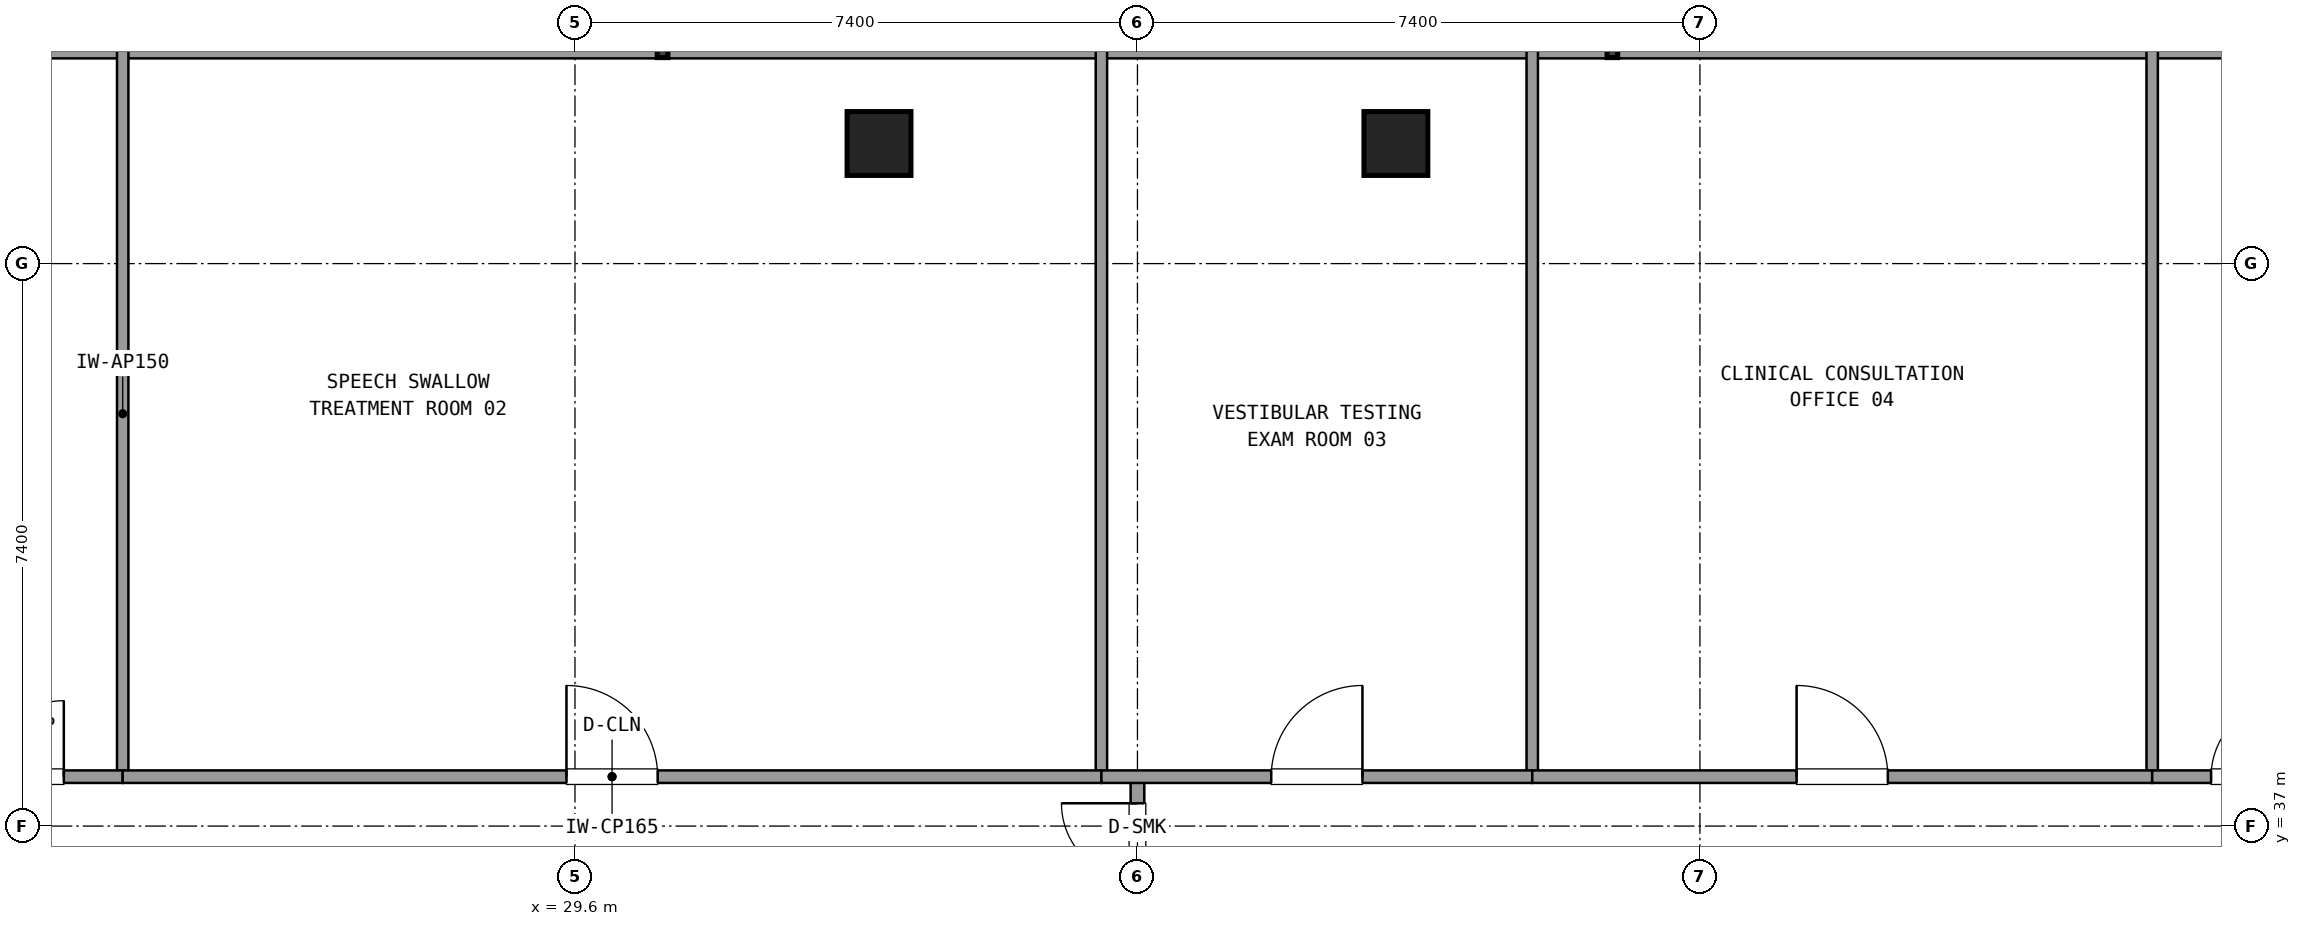
"""IFC4 building model, lengths in metres.
Left out: names, types, materials, properties, quantities, classifications, styles, units other than length and angle.
Written with IfcOpenShell. Run it as: python <this file> out.ifc"""

import sys

from ifc_helpers import new_model, si_unit, direction, frame, frame_2d, origin, origin_2d, place, context, subcontext, project, spatial, rectangle, extrude, element, fill, save


model = new_model("IFC4")
c1 = context("Model", 3, precision=1e-05, world=origin(), true_north=direction((0.0, 1.0)))
c2 = subcontext(c1, "Body", "Model", "MODEL_VIEW")
j1 = project(units=[si_unit("LENGTHUNIT", "METRE"), si_unit("PLANEANGLEUNIT", "RADIAN")], contexts=[c1])
p1 = place(None, origin())
s1 = spatial("IfcSite", under=j1, at=p1, CompositionType="ELEMENT")
p2 = place(p1, origin())
s2 = spatial("IfcBuilding", under=s1, at=p2, CompositionType="ELEMENT")
p3 = place(p2, frame((0.0, 0.0, 257.22)))
s3 = spatial("IfcBuildingStorey", under=s2, at=p3, CompositionType="ELEMENT", Elevation=257.22)
for number, where, z_axis, x_axis in (
    (1, (40.4, 45.98, 0.0), (0.0, 0.0, 1.0), (1.0, 0.0, 0.0)),
    (2, (33.6, 45.98, 0.0), (0.0, 0.0, 1.0), (1.0, 0.0, 0.0)),
):
    element("IfcColumn", number, at=place(p3, frame(where, z_axis=z_axis, x_axis=x_axis)), inside=s3, PredefinedType="COLUMN", context=c2, shape_type="SweptSolid", body=[
        extrude(rectangle(XDim=0.84, YDim=0.84, at=origin_2d()), origin(), (0.0, 0.0, 1.0), 3.6),
    ])
p4 = place(p3, frame((55.745, 47.22, 0.0), z_axis=(0.0, 0.0, 1.0), x_axis=(-1.0, 0.0, 0.0)))
e3 = element("IfcWall", 3, at=p4, inside=s3, PredefinedType="SOLIDWALL", context=c2, shape_type="SweptSolid", body=[
    extrude(rectangle(XDim=37.49, YDim=0.24, at=frame_2d((18.745, 0.0))), origin(), (0.0, 0.0, 1.0), 0.85),
])
p5 = place(p3, frame((37.0, 34.95, 0.0), z_axis=(0.0, 0.0, 1.0), x_axis=(0.0, 1.0, 0.0)))
e4 = element("IfcWall", 4, at=p5, inside=s3, PredefinedType="PARTITIONING", context=c2, shape_type="SweptSolid", body=[
    extrude(rectangle(XDim=2.7, YDim=0.18, at=frame_2d((1.35, 0.0))), origin(), (0.0, 0.0, 1.0), 2.61),
])
p6 = place(p5, frame((0.35, 0.0, 0.0)))
e5 = element("IfcOpeningElement", 5, at=p6, cuts=e4, PredefinedType="OPENING", context=c2, shape_type="SweptSolid", body=[
    extrude(rectangle(XDim=2.0, YDim=2.2, at=frame_2d((1.0, 1.1))), frame((0.0, 0.1, 0.0), z_axis=(0.0, -1.0, 0.0), x_axis=(1.0, 0.0, 0.0)), (0.0, 0.0, 1.0), 0.2),
])
p7 = place(p3, frame((23.65, 37.65, 0.0), z_axis=(0.0, 0.0, 1.0), x_axis=(0.0, 1.0, 0.0)))
e6 = element("IfcWall", 6, at=p7, inside=s3, PredefinedType="PARTITIONING", context=c2, shape_type="SweptSolid", body=[
    extrude(rectangle(XDim=9.55, YDim=0.15, at=frame_2d((4.775, 0.0))), origin(), (0.0, 0.0, 1.0), 2.61),
])
p8 = place(p3, frame((21.1, 37.65, 0.0), z_axis=(0.0, 0.0, 1.0), x_axis=(1.0, 0.0, 0.0)))
e7 = element("IfcWall", 7, at=p8, inside=s3, PredefinedType="PARTITIONING", context=c2, shape_type="SweptSolid", body=[
    extrude(rectangle(XDim=2.55, YDim=0.165, at=frame_2d((1.275, 0.0))), origin(), (0.0, 0.0, 1.0), 2.61),
])
p9 = place(p8, frame((0.775, 0.0, 0.0)))
e8 = element("IfcOpeningElement", 8, at=p9, cuts=e7, PredefinedType="OPENING", context=c2, shape_type="SweptSolid", body=[
    extrude(rectangle(XDim=1.0, YDim=2.15, at=frame_2d((0.5, 1.075))), frame((0.0, 0.093, 0.0), z_axis=(0.0, -1.0, 0.0), x_axis=(1.0, 0.0, 0.0)), (0.0, 0.0, 1.0), 0.185),
])
p10 = place(p3, frame((36.526, 37.65, 0.0), z_axis=(0.0, 0.0, 1.0), x_axis=(0.0, 1.0, 0.0)))
e9 = element("IfcWall", 9, at=p10, inside=s3, PredefinedType="PARTITIONING", context=c2, shape_type="SweptSolid", body=[
    extrude(rectangle(XDim=9.55, YDim=0.15, at=frame_2d((4.775, 0.0))), origin(), (0.0, 0.0, 1.0), 2.61),
])
p11 = place(p3, frame((23.65, 37.65, 0.0), z_axis=(0.0, 0.0, 1.0), x_axis=(1.0, 0.0, 0.0)))
e10 = element("IfcWall", 10, at=p11, inside=s3, PredefinedType="PARTITIONING", context=c2, shape_type="SweptSolid", body=[
    extrude(rectangle(XDim=12.876, YDim=0.165, at=frame_2d((6.438, 0.0))), origin(), (0.0, 0.0, 1.0), 2.61),
])
p12 = place(p11, frame((5.838, 0.0, 0.0)))
e11 = element("IfcOpeningElement", 11, at=p12, cuts=e10, PredefinedType="OPENING", context=c2, shape_type="SweptSolid", body=[
    extrude(rectangle(XDim=1.2, YDim=2.15, at=frame_2d((0.6, 1.075))), frame((0.0, 0.093, 0.0), z_axis=(0.0, -1.0, 0.0), x_axis=(1.0, 0.0, 0.0)), (0.0, 0.0, 1.0), 0.185),
])
p13 = place(p3, frame((42.194, 37.65, 0.0), z_axis=(0.0, 0.0, 1.0), x_axis=(0.0, 1.0, 0.0)))
e12 = element("IfcWall", 12, at=p13, inside=s3, PredefinedType="PARTITIONING", context=c2, shape_type="SweptSolid", body=[
    extrude(rectangle(XDim=9.55, YDim=0.15, at=frame_2d((4.775, 0.0))), origin(), (0.0, 0.0, 1.0), 2.61),
])
p14 = place(p3, frame((36.526, 37.65, 0.0), z_axis=(0.0, 0.0, 1.0), x_axis=(1.0, 0.0, 0.0)))
e13 = element("IfcWall", 13, at=p14, inside=s3, PredefinedType="PARTITIONING", context=c2, shape_type="SweptSolid", body=[
    extrude(rectangle(XDim=5.668, YDim=0.165, at=frame_2d((2.834, 0.0))), origin(), (0.0, 0.0, 1.0), 2.61),
])
p15 = place(p14, frame((2.234, 0.0, 0.0)))
e14 = element("IfcOpeningElement", 14, at=p15, cuts=e13, PredefinedType="OPENING", context=c2, shape_type="SweptSolid", body=[
    extrude(rectangle(XDim=1.2, YDim=2.15, at=frame_2d((0.6, 1.075))), frame((0.0, 0.093, 0.0), z_axis=(0.0, -1.0, 0.0), x_axis=(1.0, 0.0, 0.0)), (0.0, 0.0, 1.0), 0.185),
])
p16 = place(p3, frame((50.35, 37.65, 0.0), z_axis=(0.0, 0.0, 1.0), x_axis=(0.0, 1.0, 0.0)))
e15 = element("IfcWall", 15, at=p16, inside=s3, PredefinedType="PARTITIONING", context=c2, shape_type="SweptSolid", body=[
    extrude(rectangle(XDim=9.55, YDim=0.15, at=frame_2d((4.775, 0.0))), origin(), (0.0, 0.0, 1.0), 2.61),
])
p17 = place(p3, frame((42.194, 37.65, 0.0), z_axis=(0.0, 0.0, 1.0), x_axis=(1.0, 0.0, 0.0)))
e16 = element("IfcWall", 16, at=p17, inside=s3, PredefinedType="PARTITIONING", context=c2, shape_type="SweptSolid", body=[
    extrude(rectangle(XDim=8.156, YDim=0.165, at=frame_2d((4.078, 0.0))), origin(), (0.0, 0.0, 1.0), 2.61),
])
p18 = place(p17, frame((3.478, 0.0, 0.0)))
e17 = element("IfcOpeningElement", 17, at=p18, cuts=e16, PredefinedType="OPENING", context=c2, shape_type="SweptSolid", body=[
    extrude(rectangle(XDim=1.2, YDim=2.15, at=frame_2d((0.6, 1.075))), frame((0.0, 0.093, 0.0), z_axis=(0.0, -1.0, 0.0), x_axis=(1.0, 0.0, 0.0)), (0.0, 0.0, 1.0), 0.185),
])
p19 = place(p3, frame((50.35, 37.65, 0.0), z_axis=(0.0, 0.0, 1.0), x_axis=(1.0, 0.0, 0.0)))
e18 = element("IfcWall", 18, at=p19, inside=s3, PredefinedType="PARTITIONING", context=c2, shape_type="SweptSolid", body=[
    extrude(rectangle(XDim=2.55, YDim=0.165, at=frame_2d((1.275, 0.0))), origin(), (0.0, 0.0, 1.0), 2.61),
])
p20 = place(p19, frame((0.775, 0.0, 0.0)))
e19 = element("IfcOpeningElement", 19, at=p20, cuts=e18, PredefinedType="OPENING", context=c2, shape_type="SweptSolid", body=[
    extrude(rectangle(XDim=1.0, YDim=2.15, at=frame_2d((0.5, 1.075))), frame((0.0, 0.093, 0.0), z_axis=(0.0, -1.0, 0.0), x_axis=(1.0, 0.0, 0.0)), (0.0, 0.0, 1.0), 0.185),
])
p21 = place(p6, origin())
e20 = element("IfcDoor", 20, at=p21, inside=s3, OperationType="DOUBLE_DOOR_SINGLE_SWING", PredefinedType="DOOR", context=c2, shape_type="SweptSolid", body=[
    extrude(rectangle(XDim=2.0, YDim=2.2, at=frame_2d((1.0, 1.1))), frame((0.0, 0.025, 0.0), z_axis=(0.0, -1.0, 0.0), x_axis=(1.0, 0.0, 0.0)), (0.0, 0.0, 1.0), 0.05),
])
fill(e5, e20)
p22 = place(p9, origin())
e21 = element("IfcDoor", 21, at=p22, inside=s3, OperationType="SINGLE_SWING_RIGHT", PredefinedType="DOOR", context=c2, shape_type="SweptSolid", body=[
    extrude(rectangle(XDim=1.0, YDim=2.15, at=frame_2d((0.5, 1.075))), frame((0.0, 0.025, 0.0), z_axis=(0.0, -1.0, 0.0), x_axis=(1.0, 0.0, 0.0)), (0.0, 0.0, 1.0), 0.05),
])
fill(e8, e21)
p23 = place(p12, origin())
e22 = element("IfcDoor", 22, at=p23, inside=s3, OperationType="SINGLE_SWING_LEFT", PredefinedType="DOOR", context=c2, shape_type="SweptSolid", body=[
    extrude(rectangle(XDim=1.2, YDim=2.15, at=frame_2d((0.6, 1.075))), frame((0.0, 0.025, 0.0), z_axis=(0.0, -1.0, 0.0), x_axis=(1.0, 0.0, 0.0)), (0.0, 0.0, 1.0), 0.05),
])
fill(e11, e22)
p24 = place(p15, origin())
e23 = element("IfcDoor", 23, at=p24, inside=s3, OperationType="SINGLE_SWING_RIGHT", PredefinedType="DOOR", context=c2, shape_type="SweptSolid", body=[
    extrude(rectangle(XDim=1.2, YDim=2.15, at=frame_2d((0.6, 1.075))), frame((0.0, 0.025, 0.0), z_axis=(0.0, -1.0, 0.0), x_axis=(1.0, 0.0, 0.0)), (0.0, 0.0, 1.0), 0.05),
])
fill(e14, e23)
p25 = place(p18, origin())
e24 = element("IfcDoor", 24, at=p25, inside=s3, OperationType="SINGLE_SWING_LEFT", PredefinedType="DOOR", context=c2, shape_type="SweptSolid", body=[
    extrude(rectangle(XDim=1.2, YDim=2.15, at=frame_2d((0.6, 1.075))), frame((0.0, 0.025, 0.0), z_axis=(0.0, -1.0, 0.0), x_axis=(1.0, 0.0, 0.0)), (0.0, 0.0, 1.0), 0.05),
])
fill(e17, e24)
p26 = place(p20, origin())
e25 = element("IfcDoor", 25, at=p26, inside=s3, OperationType="SINGLE_SWING_RIGHT", PredefinedType="DOOR", context=c2, shape_type="SweptSolid", body=[
    extrude(rectangle(XDim=1.0, YDim=2.15, at=frame_2d((0.5, 1.075))), frame((0.0, 0.025, 0.0), z_axis=(0.0, -1.0, 0.0), x_axis=(1.0, 0.0, 0.0)), (0.0, 0.0, 1.0), 0.05),
])
fill(e19, e25)
save(model, sys.argv[1])
